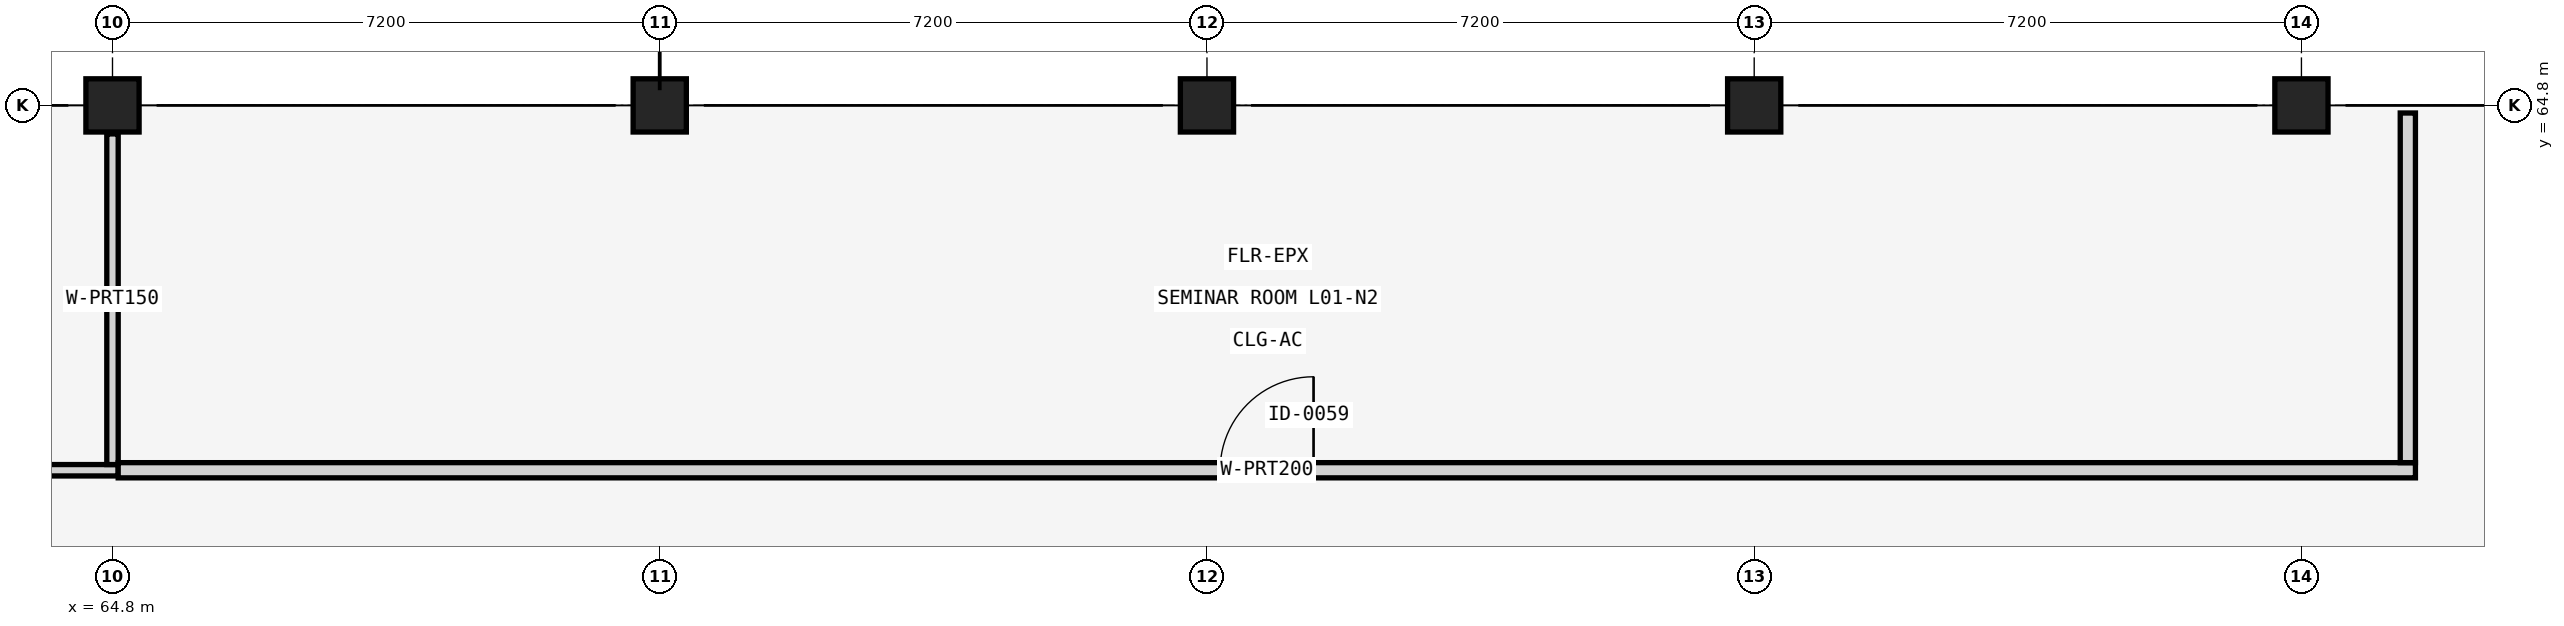
"""IFC4 building model, lengths in metres.
Left out: names, types, materials, properties, quantities, classifications, styles, units other than length and angle.
Written with IfcOpenShell. Run it as: python <this file> out.ifc"""

import sys

from ifc_helpers import new_model, si_unit, direction, frame, frame_2d, origin, origin_2d, place, context, subcontext, project, spatial, rectangle, extrude, element, fill, save


model = new_model("IFC4")
c1 = context("Model", 3, precision=1e-05, world=origin(), true_north=direction((0.0, 1.0)))
c2 = subcontext(c1, "Body", "Model", "MODEL_VIEW")
j1 = project(units=[si_unit("LENGTHUNIT", "METRE"), si_unit("PLANEANGLEUNIT", "RADIAN")], contexts=[c1])
p1 = place(None, origin())
s1 = spatial("IfcSite", under=j1, at=p1, CompositionType="ELEMENT")
p2 = place(p1, origin())
s2 = spatial("IfcBuilding", under=s1, at=p2, CompositionType="ELEMENT")
p3 = place(p2, frame((0.0, 0.0, 4.8)))
s3 = spatial("IfcBuildingStorey", under=s2, at=p3, CompositionType="ELEMENT", Elevation=4.8)
for number, where, z_axis, x_axis in (
    (1, (64.8, 64.8, 0.0), (0.0, 0.0, 1.0), (1.0, 0.0, 0.0)),
    (2, (72.0, 64.8, 0.0), (0.0, 0.0, 1.0), (1.0, 0.0, 0.0)),
    (3, (79.2, 64.8, 0.0), (0.0, 0.0, 1.0), (1.0, 0.0, 0.0)),
    (4, (86.4, 64.8, 0.0), (0.0, 0.0, 1.0), (1.0, 0.0, 0.0)),
    (5, (93.6, 64.8, 0.0), (0.0, 0.0, 1.0), (1.0, 0.0, 0.0)),
):
    element("IfcColumn", number, at=place(p3, frame(where, z_axis=z_axis, x_axis=x_axis)), inside=s3, PredefinedType="COLUMN", context=c2, shape_type="SweptSolid", body=[
        extrude(rectangle(XDim=0.7, YDim=0.7, at=origin_2d()), origin(), (0.0, 0.0, 1.0), 4.16),
    ])
p4 = place(p3, frame((43.125, 60.0, 0.0), z_axis=(0.0, 0.0, 1.0), x_axis=(1.0, 0.0, 0.0)))
e6 = element("IfcWall", 6, at=p4, inside=s3, PredefinedType="PARTITIONING", context=c2, shape_type="SweptSolid", body=[
    extrude(rectangle(XDim=21.75, YDim=0.15, at=frame_2d((10.875, 0.0))), origin(), (0.0, 0.0, 1.0), 3.26),
])
p5 = place(p4, frame((10.285, 0.0, 0.0)))
e7 = element("IfcOpeningElement", 7, at=p5, cuts=e6, PredefinedType="OPENING", context=c2, shape_type="SweptSolid", body=[
    extrude(rectangle(XDim=1.18, YDim=2.08, at=frame_2d((0.59, 1.04))), frame((0.0, 0.085, 0.0), z_axis=(0.0, -1.0, 0.0), x_axis=(1.0, 0.0, 0.0)), (0.0, 0.0, 1.0), 0.17),
])
p6 = place(p3, frame((64.8, 60.075, 0.0), z_axis=(0.0, 0.0, 1.0), x_axis=(0.0, 1.0, 0.0)))
e8 = element("IfcWall", 8, at=p6, inside=s3, PredefinedType="PARTITIONING", context=c2, shape_type="SweptSolid", body=[
    extrude(rectangle(XDim=4.35, YDim=0.15, at=frame_2d((2.175, 0.0))), origin(), (0.0, 0.0, 1.0), 3.26),
])
p7 = place(p3, frame((64.875, 60.0, 0.0), z_axis=(0.0, 0.0, 1.0), x_axis=(1.0, 0.0, 0.0)))
e9 = element("IfcWall", 9, at=p7, inside=s3, PredefinedType="PARTITIONING", context=c2, shape_type="SweptSolid", body=[
    extrude(rectangle(XDim=30.225, YDim=0.2, at=frame_2d((15.113, 0.0))), origin(), (0.0, 0.0, 1.0), 3.26),
])
p8 = place(p7, frame((14.498, 0.0, 0.0)))
e10 = element("IfcOpeningElement", 10, at=p8, cuts=e9, PredefinedType="OPENING", context=c2, shape_type="SweptSolid", body=[
    extrude(rectangle(XDim=1.23, YDim=2.12, at=frame_2d((0.615, 1.06))), frame((0.0, 0.11, 0.0), z_axis=(0.0, -1.0, 0.0), x_axis=(1.0, 0.0, 0.0)), (0.0, 0.0, 1.0), 0.22),
])
p9 = place(p3, frame((95.0, 60.1, 0.0), z_axis=(0.0, 0.0, 1.0), x_axis=(0.0, 1.0, 0.0)))
e11 = element("IfcWall", 11, at=p9, inside=s3, PredefinedType="PARTITIONING", context=c2, shape_type="SweptSolid", body=[
    extrude(rectangle(XDim=4.6, YDim=0.2, at=frame_2d((2.3, 0.0))), origin(), (0.0, 0.0, 1.0), 3.21),
])
p10 = place(p8, origin())
e12 = element("IfcDoor", 12, at=p10, inside=s3, OperationType="SINGLE_SWING_RIGHT", PredefinedType="DOOR", context=c2, shape_type="SweptSolid", body=[
    extrude(rectangle(XDim=1.23, YDim=2.12, at=frame_2d((0.615, 1.06))), frame((0.0, 0.025, 0.0), z_axis=(0.0, -1.0, 0.0), x_axis=(1.0, 0.0, 0.0)), (0.0, 0.0, 1.0), 0.05),
])
fill(e10, e12)
save(model, sys.argv[1])
